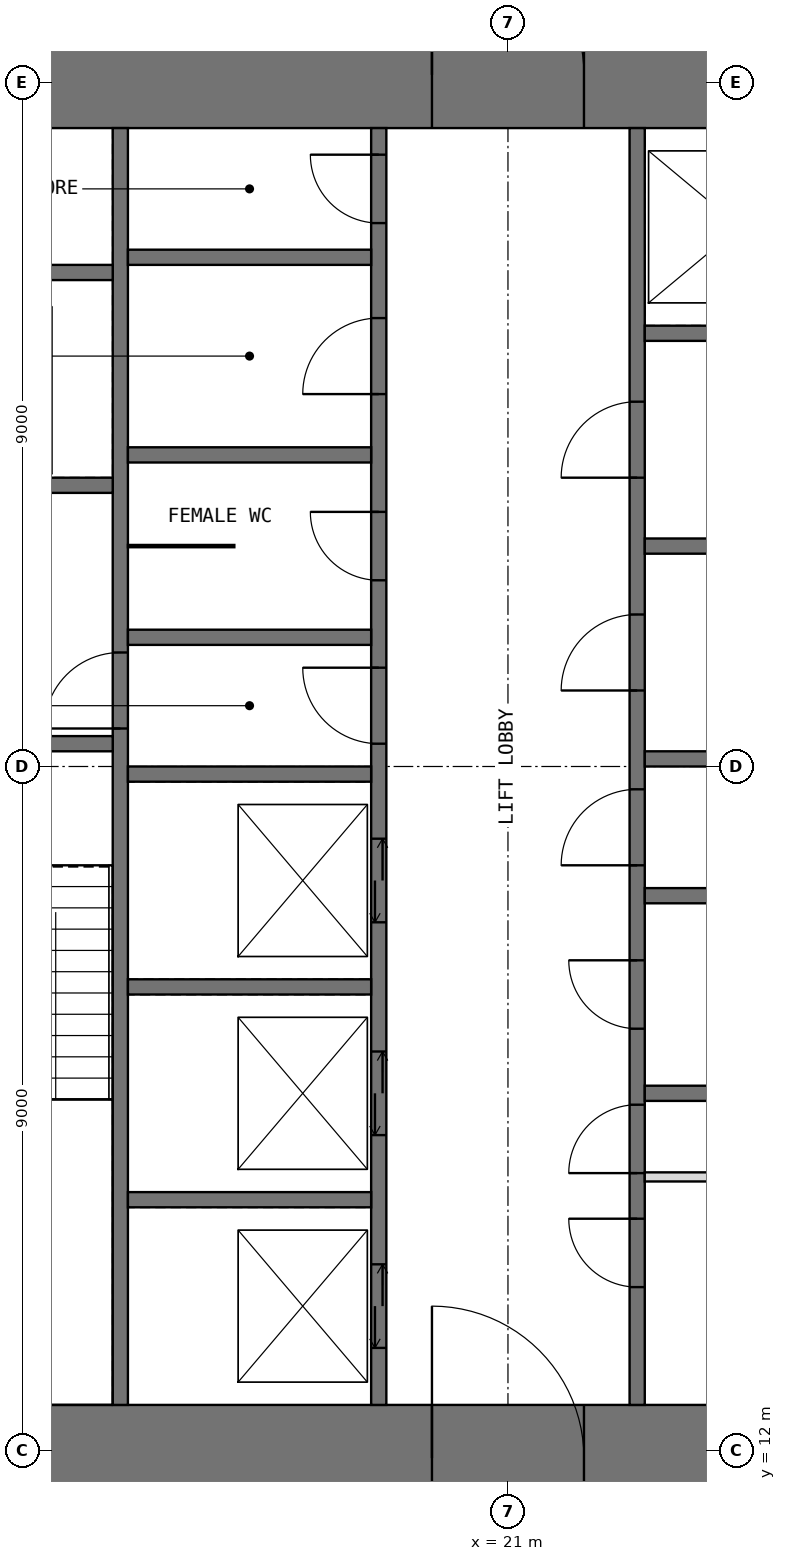
"""IFC4 building model, lengths in metres.
Left out: names, types, materials, properties, quantities, classifications, styles, units other than length and angle.
Written with IfcOpenShell. Run it as: python <this file> out.ifc"""

import sys

from ifc_helpers import new_model, si_unit, direction, frame, frame_2d, origin, place, context, subcontext, project, spatial, rectangle, extrude, element, fill, save


model = new_model("IFC4")
c1 = context("Model", 3, precision=1e-05, world=origin(), true_north=direction((0.0, 1.0)))
c2 = subcontext(c1, "Body", "Model", "MODEL_VIEW")
j1 = project(units=[si_unit("LENGTHUNIT", "METRE"), si_unit("PLANEANGLEUNIT", "RADIAN")], contexts=[c1])
p1 = place(None, origin())
s1 = spatial("IfcSite", under=j1, at=p1, CompositionType="ELEMENT")
p2 = place(p1, origin())
s2 = spatial("IfcBuilding", under=s1, at=p2, CompositionType="ELEMENT")
p3 = place(p2, frame((0.0, 0.0, 218.5)))
s3 = spatial("IfcBuildingStorey", under=s2, at=p3, CompositionType="ELEMENT", Elevation=218.5)
p4 = place(p3, frame((11.2, 11.9, -0.05), z_axis=(0.0, 0.0, 1.0), x_axis=(1.0, 0.0, 0.0)))
e1 = element("IfcWall", 1, at=p4, inside=s3, PredefinedType="SHEAR", context=c2, shape_type="SweptSolid", body=[
    extrude(rectangle(XDim=19.6, YDim=1.4, at=frame_2d((9.8, 0.0))), origin(), (0.0, 0.0, 1.0), 4.0),
])
p5 = place(p4, frame((8.8, 0.0, 0.05)))
e2 = element("IfcOpeningElement", 2, at=p5, cuts=e1, PredefinedType="OPENING", context=c2, shape_type="SweptSolid", body=[
    extrude(rectangle(XDim=2.0, YDim=2.2, at=frame_2d((1.0, 1.1))), frame((0.0, 0.71, 0.0), z_axis=(0.0, -1.0, 0.0), x_axis=(1.0, 0.0, 0.0)), (0.0, 0.0, 1.0), 1.42),
])
p6 = place(p3, frame((11.2, 30.1, -0.05), z_axis=(0.0, 0.0, 1.0), x_axis=(1.0, 0.0, 0.0)))
e3 = element("IfcWall", 3, at=p6, inside=s3, PredefinedType="SHEAR", context=c2, shape_type="SweptSolid", body=[
    extrude(rectangle(XDim=19.6, YDim=1.4, at=frame_2d((9.8, 0.0))), origin(), (0.0, 0.0, 1.0), 4.0),
])
p7 = place(p6, frame((8.8, 0.0, 0.05)))
e4 = element("IfcOpeningElement", 4, at=p7, cuts=e3, PredefinedType="OPENING", context=c2, shape_type="SweptSolid", body=[
    extrude(rectangle(XDim=2.0, YDim=2.2, at=frame_2d((1.0, 1.1))), frame((0.0, 0.71, 0.0), z_axis=(0.0, -1.0, 0.0), x_axis=(1.0, 0.0, 0.0)), (0.0, 0.0, 1.0), 1.42),
])
p8 = place(p3, frame((15.9, 12.6, -0.05), z_axis=(0.0, 0.0, 1.0), x_axis=(0.0, 1.0, 0.0)))
e5 = element("IfcWall", 5, at=p8, inside=s3, PredefinedType="SHEAR", context=c2, shape_type="SweptSolid", body=[
    extrude(rectangle(XDim=16.8, YDim=0.2, at=frame_2d((8.4, 0.0))), origin(), (0.0, 0.0, 1.0), 4.0),
])
p9 = place(p8, frame((8.9, 0.0, 0.05)))
e6 = element("IfcOpeningElement", 6, at=p9, cuts=e5, PredefinedType="OPENING", context=c2, shape_type="SweptSolid", body=[
    extrude(rectangle(XDim=1.0, YDim=2.2, at=frame_2d((0.5, 1.1))), frame((0.0, 0.11, 0.0), z_axis=(0.0, -1.0, 0.0), x_axis=(1.0, 0.0, 0.0)), (0.0, 0.0, 1.0), 0.22),
])
p10 = place(p3, frame((19.3, 12.6, -0.05), z_axis=(0.0, 0.0, 1.0), x_axis=(0.0, 1.0, 0.0)))
e7 = element("IfcWall", 7, at=p10, inside=s3, PredefinedType="SHEAR", context=c2, shape_type="SweptSolid", body=[
    extrude(rectangle(XDim=16.8, YDim=0.2, at=frame_2d((8.4, 0.0))), origin(), (0.0, 0.0, 1.0), 4.0),
])
p11 = place(p10, frame((8.7, 0.0, 0.05)))
e8 = element("IfcOpeningElement", 8, at=p11, cuts=e7, PredefinedType="OPENING", context=c2, shape_type="SweptSolid", body=[
    extrude(rectangle(XDim=1.0, YDim=2.2, at=frame_2d((0.5, 1.1))), frame((0.0, 0.11, 0.0), z_axis=(0.0, -1.0, 0.0), x_axis=(1.0, 0.0, 0.0)), (0.0, 0.0, 1.0), 0.22),
])
p12 = place(p10, frame((10.85, 0.0, 0.05)))
e9 = element("IfcOpeningElement", 9, at=p12, cuts=e7, PredefinedType="OPENING", context=c2, shape_type="SweptSolid", body=[
    extrude(rectangle(XDim=0.9, YDim=2.2, at=frame_2d((0.45, 1.1))), frame((0.0, 0.11, 0.0), z_axis=(0.0, -1.0, 0.0), x_axis=(1.0, 0.0, 0.0)), (0.0, 0.0, 1.0), 0.22),
])
p13 = place(p10, frame((13.3, 0.0, 0.05)))
e10 = element("IfcOpeningElement", 10, at=p13, cuts=e7, PredefinedType="OPENING", context=c2, shape_type="SweptSolid", body=[
    extrude(rectangle(XDim=1.0, YDim=2.2, at=frame_2d((0.5, 1.1))), frame((0.0, 0.11, 0.0), z_axis=(0.0, -1.0, 0.0), x_axis=(1.0, 0.0, 0.0)), (0.0, 0.0, 1.0), 0.22),
])
p14 = place(p10, frame((15.55, 0.0, 0.05)))
e11 = element("IfcOpeningElement", 11, at=p14, cuts=e7, PredefinedType="OPENING", context=c2, shape_type="SweptSolid", body=[
    extrude(rectangle(XDim=0.9, YDim=2.2, at=frame_2d((0.45, 1.1))), frame((0.0, 0.11, 0.0), z_axis=(0.0, -1.0, 0.0), x_axis=(1.0, 0.0, 0.0)), (0.0, 0.0, 1.0), 0.22),
])
p15 = place(p10, frame((0.75, 0.0, 0.05)))
e12 = element("IfcOpeningElement", 12, at=p15, cuts=e7, PredefinedType="OPENING", context=c2, shape_type="SweptSolid", body=[
    extrude(rectangle(XDim=1.1, YDim=2.2, at=frame_2d((0.55, 1.1))), frame((0.0, 0.11, 0.0), z_axis=(0.0, -1.0, 0.0), x_axis=(1.0, 0.0, 0.0)), (0.0, 0.0, 1.0), 0.22),
])
p16 = place(p10, frame((3.55, 0.0, 0.05)))
e13 = element("IfcOpeningElement", 13, at=p16, cuts=e7, PredefinedType="OPENING", context=c2, shape_type="SweptSolid", body=[
    extrude(rectangle(XDim=1.1, YDim=2.2, at=frame_2d((0.55, 1.1))), frame((0.0, 0.11, 0.0), z_axis=(0.0, -1.0, 0.0), x_axis=(1.0, 0.0, 0.0)), (0.0, 0.0, 1.0), 0.22),
])
p17 = place(p10, frame((6.35, 0.0, 0.05)))
e14 = element("IfcOpeningElement", 14, at=p17, cuts=e7, PredefinedType="OPENING", context=c2, shape_type="SweptSolid", body=[
    extrude(rectangle(XDim=1.1, YDim=2.2, at=frame_2d((0.55, 1.1))), frame((0.0, 0.11, 0.0), z_axis=(0.0, -1.0, 0.0), x_axis=(1.0, 0.0, 0.0)), (0.0, 0.0, 1.0), 0.22),
])
p18 = place(p3, frame((22.7, 12.6, -0.05), z_axis=(0.0, 0.0, 1.0), x_axis=(0.0, 1.0, 0.0)))
e15 = element("IfcWall", 15, at=p18, inside=s3, PredefinedType="SHEAR", context=c2, shape_type="SweptSolid", body=[
    extrude(rectangle(XDim=16.8, YDim=0.2, at=frame_2d((8.4, 0.0))), origin(), (0.0, 0.0, 1.0), 4.0),
])
p19 = place(p18, frame((3.05, 0.0, 0.05)))
e16 = element("IfcOpeningElement", 16, at=p19, cuts=e15, PredefinedType="OPENING", context=c2, shape_type="SweptSolid", body=[
    extrude(rectangle(XDim=0.9, YDim=2.2, at=frame_2d((0.45, 1.1))), frame((0.0, 0.11, 0.0), z_axis=(0.0, -1.0, 0.0), x_axis=(1.0, 0.0, 0.0)), (0.0, 0.0, 1.0), 0.22),
])
p20 = place(p18, frame((7.1, 0.0, 0.05)))
e17 = element("IfcOpeningElement", 17, at=p20, cuts=e15, PredefinedType="OPENING", context=c2, shape_type="SweptSolid", body=[
    extrude(rectangle(XDim=1.0, YDim=2.2, at=frame_2d((0.5, 1.1))), frame((0.0, 0.11, 0.0), z_axis=(0.0, -1.0, 0.0), x_axis=(1.0, 0.0, 0.0)), (0.0, 0.0, 1.0), 0.22),
])
p21 = place(p18, frame((1.55, 0.0, 0.05)))
e18 = element("IfcOpeningElement", 18, at=p21, cuts=e15, PredefinedType="OPENING", context=c2, shape_type="SweptSolid", body=[
    extrude(rectangle(XDim=0.9, YDim=2.2, at=frame_2d((0.45, 1.1))), frame((0.0, 0.11, 0.0), z_axis=(0.0, -1.0, 0.0), x_axis=(1.0, 0.0, 0.0)), (0.0, 0.0, 1.0), 0.22),
])
p22 = place(p18, frame((4.95, 0.0, 0.05)))
e19 = element("IfcOpeningElement", 19, at=p22, cuts=e15, PredefinedType="OPENING", context=c2, shape_type="SweptSolid", body=[
    extrude(rectangle(XDim=0.9, YDim=2.2, at=frame_2d((0.45, 1.1))), frame((0.0, 0.11, 0.0), z_axis=(0.0, -1.0, 0.0), x_axis=(1.0, 0.0, 0.0)), (0.0, 0.0, 1.0), 0.22),
])
p23 = place(p18, frame((9.4, 0.0, 0.05)))
e20 = element("IfcOpeningElement", 20, at=p23, cuts=e15, PredefinedType="OPENING", context=c2, shape_type="SweptSolid", body=[
    extrude(rectangle(XDim=1.0, YDim=2.2, at=frame_2d((0.5, 1.1))), frame((0.0, 0.11, 0.0), z_axis=(0.0, -1.0, 0.0), x_axis=(1.0, 0.0, 0.0)), (0.0, 0.0, 1.0), 0.22),
])
p24 = place(p18, frame((12.2, 0.0, 0.05)))
e21 = element("IfcOpeningElement", 21, at=p24, cuts=e15, PredefinedType="OPENING", context=c2, shape_type="SweptSolid", body=[
    extrude(rectangle(XDim=1.0, YDim=2.2, at=frame_2d((0.5, 1.1))), frame((0.0, 0.11, 0.0), z_axis=(0.0, -1.0, 0.0), x_axis=(1.0, 0.0, 0.0)), (0.0, 0.0, 1.0), 0.22),
])
p25 = place(p3, frame((12.6, 21.3, -0.05), z_axis=(0.0, 0.0, 1.0), x_axis=(1.0, 0.0, 0.0)))
e22 = element("IfcWall", 22, at=p25, inside=s3, PredefinedType="SHEAR", context=c2, shape_type="SweptSolid", body=[
    extrude(rectangle(XDim=3.2, YDim=0.2, at=frame_2d((1.6, 0.0))), origin(), (0.0, 0.0, 1.0), 4.0),
])
p26 = place(p25, frame((1.1, 0.0, 0.05)))
e23 = element("IfcOpeningElement", 23, at=p26, cuts=e22, PredefinedType="OPENING", context=c2, shape_type="SweptSolid", body=[
    extrude(rectangle(XDim=1.0, YDim=2.2, at=frame_2d((0.5, 1.1))), frame((0.0, 0.11, 0.0), z_axis=(0.0, -1.0, 0.0), x_axis=(1.0, 0.0, 0.0)), (0.0, 0.0, 1.0), 0.22),
])
p27 = place(p3, frame((12.6, 24.7, -0.05), z_axis=(0.0, 0.0, 1.0), x_axis=(1.0, 0.0, 0.0)))
e24 = element("IfcWall", 24, at=p27, inside=s3, PredefinedType="SHEAR", context=c2, shape_type="SweptSolid", body=[
    extrude(rectangle(XDim=3.2, YDim=0.2, at=frame_2d((1.6, 0.0))), origin(), (0.0, 0.0, 1.0), 4.0),
])
p28 = place(p27, frame((1.0, 0.0, 0.05)))
e25 = element("IfcOpeningElement", 25, at=p28, cuts=e24, PredefinedType="OPENING", context=c2, shape_type="SweptSolid", body=[
    extrude(rectangle(XDim=1.2, YDim=2.2, at=frame_2d((0.6, 1.1))), frame((0.0, 0.11, 0.0), z_axis=(0.0, -1.0, 0.0), x_axis=(1.0, 0.0, 0.0)), (0.0, 0.0, 1.0), 0.22),
])
for number, where, z_axis, x_axis in (
    (26, (12.6, 27.5, -0.05), (0.0, 0.0, 1.0), (1.0, 0.0, 0.0)),
    (27, (16.0, 15.3, -0.05), (0.0, 0.0, 1.0), (1.0, 0.0, 0.0)),
    (28, (16.0, 18.1, -0.05), (0.0, 0.0, 1.0), (1.0, 0.0, 0.0)),
    (29, (16.0, 20.9, -0.05), (0.0, 0.0, 1.0), (1.0, 0.0, 0.0)),
    (30, (16.0, 22.7, -0.05), (0.0, 0.0, 1.0), (1.0, 0.0, 0.0)),
    (31, (16.0, 25.1, -0.05), (0.0, 0.0, 1.0), (1.0, 0.0, 0.0)),
    (32, (16.0, 27.7, -0.05), (0.0, 0.0, 1.0), (1.0, 0.0, 0.0)),
    (33, (22.8, 16.7, -0.05), (0.0, 0.0, 1.0), (1.0, 0.0, 0.0)),
    (34, (22.8, 19.3, -0.05), (0.0, 0.0, 1.0), (1.0, 0.0, 0.0)),
    (35, (22.8, 21.1, -0.05), (0.0, 0.0, 1.0), (1.0, 0.0, 0.0)),
    (36, (22.8, 23.9, -0.05), (0.0, 0.0, 1.0), (1.0, 0.0, 0.0)),
    (37, (22.8, 26.7, -0.05), (0.0, 0.0, 1.0), (1.0, 0.0, 0.0)),
):
    element("IfcWall", number, at=place(p3, frame(where, z_axis=z_axis, x_axis=x_axis)), inside=s3, PredefinedType="SHEAR", context=c2, shape_type="SweptSolid", body=[
        extrude(rectangle(XDim=3.2, YDim=0.2, at=frame_2d((1.6, 0.0))), origin(), (0.0, 0.0, 1.0), 4.0),
    ])
p29 = place(p3, frame((22.8, 15.6, 0.0), z_axis=(0.0, 0.0, 1.0), x_axis=(1.0, 0.0, 0.0)))
e38 = element("IfcWall", 38, at=p29, inside=s3, PredefinedType="PARTITIONING", context=c2, shape_type="SweptSolid", body=[
    extrude(rectangle(XDim=3.2, YDim=0.12, at=frame_2d((1.6, 0.0))), origin(), (0.0, 0.0, 1.0), 3.75),
])
p30 = place(p3, frame((16.0, 23.9, 0.0), z_axis=(0.0, 0.0, 1.0), x_axis=(1.0, 0.0, 0.0)))
e39 = element("IfcWall", 39, at=p30, inside=s3, PredefinedType="PARTITIONING", context=c2, shape_type="SweptSolid", body=[
    extrude(rectangle(XDim=1.4, YDim=0.03, at=frame_2d((0.7, 0.0))), origin(), (0.0, 0.0, 1.0), 3.75),
])
p31 = place(p5, origin())
e40 = element("IfcDoor", 40, at=p31, inside=s3, OperationType="DOUBLE_DOOR_SINGLE_SWING", PredefinedType="DOOR", context=c2, shape_type="SweptSolid", body=[
    extrude(rectangle(XDim=2.0, YDim=2.2, at=frame_2d((1.0, 1.1))), frame((0.0, 0.025, 0.0), z_axis=(0.0, -1.0, 0.0), x_axis=(1.0, 0.0, 0.0)), (0.0, 0.0, 1.0), 0.05),
])
fill(e2, e40)
p32 = place(p7, origin())
e41 = element("IfcDoor", 41, at=p32, inside=s3, OperationType="DOUBLE_DOOR_SINGLE_SWING", PredefinedType="DOOR", context=c2, shape_type="SweptSolid", body=[
    extrude(rectangle(XDim=2.0, YDim=2.2, at=frame_2d((1.0, 1.1))), frame((0.0, 0.025, 0.0), z_axis=(0.0, -1.0, 0.0), x_axis=(1.0, 0.0, 0.0)), (0.0, 0.0, 1.0), 0.05),
])
fill(e4, e41)
p33 = place(p19, origin())
e42 = element("IfcDoor", 42, at=p33, inside=s3, OperationType="SINGLE_SWING_LEFT", PredefinedType="DOOR", context=c2, shape_type="SweptSolid", body=[
    extrude(rectangle(XDim=0.9, YDim=2.2, at=frame_2d((0.45, 1.1))), frame((0.0, 0.025, 0.0), z_axis=(0.0, -1.0, 0.0), x_axis=(1.0, 0.0, 0.0)), (0.0, 0.0, 1.0), 0.05),
])
fill(e16, e42)
p34 = place(p9, origin())
e43 = element("IfcDoor", 43, at=p34, inside=s3, OperationType="SINGLE_SWING_LEFT", PredefinedType="DOOR", context=c2, shape_type="SweptSolid", body=[
    extrude(rectangle(XDim=1.0, YDim=2.2, at=frame_2d((0.5, 1.1))), frame((0.0, 0.025, 0.0), z_axis=(0.0, -1.0, 0.0), x_axis=(1.0, 0.0, 0.0)), (0.0, 0.0, 1.0), 0.05),
])
fill(e6, e43)
p35 = place(p11, origin())
e44 = element("IfcDoor", 44, at=p35, inside=s3, OperationType="SINGLE_SWING_RIGHT", PredefinedType="DOOR", context=c2, shape_type="SweptSolid", body=[
    extrude(rectangle(XDim=1.0, YDim=2.2, at=frame_2d((0.5, 1.1))), frame((0.0, 0.025, 0.0), z_axis=(0.0, -1.0, 0.0), x_axis=(1.0, 0.0, 0.0)), (0.0, 0.0, 1.0), 0.05),
])
fill(e8, e44)
p36 = place(p20, origin())
e45 = element("IfcDoor", 45, at=p36, inside=s3, OperationType="SINGLE_SWING_LEFT", PredefinedType="DOOR", context=c2, shape_type="SweptSolid", body=[
    extrude(rectangle(XDim=1.0, YDim=2.2, at=frame_2d((0.5, 1.1))), frame((0.0, 0.025, 0.0), z_axis=(0.0, -1.0, 0.0), x_axis=(1.0, 0.0, 0.0)), (0.0, 0.0, 1.0), 0.05),
])
fill(e17, e45)
p37 = place(p12, origin())
e46 = element("IfcDoor", 46, at=p37, inside=s3, OperationType="SINGLE_SWING_RIGHT", PredefinedType="DOOR", context=c2, shape_type="SweptSolid", body=[
    extrude(rectangle(XDim=0.9, YDim=2.2, at=frame_2d((0.45, 1.1))), frame((0.0, 0.025, 0.0), z_axis=(0.0, -1.0, 0.0), x_axis=(1.0, 0.0, 0.0)), (0.0, 0.0, 1.0), 0.05),
])
fill(e9, e46)
p38 = place(p13, origin())
e47 = element("IfcDoor", 47, at=p38, inside=s3, OperationType="SINGLE_SWING_LEFT", PredefinedType="DOOR", context=c2, shape_type="SweptSolid", body=[
    extrude(rectangle(XDim=1.0, YDim=2.2, at=frame_2d((0.5, 1.1))), frame((0.0, 0.025, 0.0), z_axis=(0.0, -1.0, 0.0), x_axis=(1.0, 0.0, 0.0)), (0.0, 0.0, 1.0), 0.05),
])
fill(e10, e47)
p39 = place(p14, origin())
e48 = element("IfcDoor", 48, at=p39, inside=s3, OperationType="SINGLE_SWING_RIGHT", PredefinedType="DOOR", context=c2, shape_type="SweptSolid", body=[
    extrude(rectangle(XDim=0.9, YDim=2.2, at=frame_2d((0.45, 1.1))), frame((0.0, 0.025, 0.0), z_axis=(0.0, -1.0, 0.0), x_axis=(1.0, 0.0, 0.0)), (0.0, 0.0, 1.0), 0.05),
])
fill(e11, e48)
p40 = place(p21, origin())
e49 = element("IfcDoor", 49, at=p40, inside=s3, OperationType="SINGLE_SWING_RIGHT", PredefinedType="DOOR", context=c2, shape_type="SweptSolid", body=[
    extrude(rectangle(XDim=0.9, YDim=2.2, at=frame_2d((0.45, 1.1))), frame((0.0, 0.025, 0.0), z_axis=(0.0, -1.0, 0.0), x_axis=(1.0, 0.0, 0.0)), (0.0, 0.0, 1.0), 0.05),
])
fill(e18, e49)
p41 = place(p22, origin())
e50 = element("IfcDoor", 50, at=p41, inside=s3, OperationType="SINGLE_SWING_RIGHT", PredefinedType="DOOR", context=c2, shape_type="SweptSolid", body=[
    extrude(rectangle(XDim=0.9, YDim=2.2, at=frame_2d((0.45, 1.1))), frame((0.0, 0.025, 0.0), z_axis=(0.0, -1.0, 0.0), x_axis=(1.0, 0.0, 0.0)), (0.0, 0.0, 1.0), 0.05),
])
fill(e19, e50)
p42 = place(p23, origin())
e51 = element("IfcDoor", 51, at=p42, inside=s3, OperationType="SINGLE_SWING_LEFT", PredefinedType="DOOR", context=c2, shape_type="SweptSolid", body=[
    extrude(rectangle(XDim=1.0, YDim=2.2, at=frame_2d((0.5, 1.1))), frame((0.0, 0.025, 0.0), z_axis=(0.0, -1.0, 0.0), x_axis=(1.0, 0.0, 0.0)), (0.0, 0.0, 1.0), 0.05),
])
fill(e20, e51)
p43 = place(p24, origin())
e52 = element("IfcDoor", 52, at=p43, inside=s3, OperationType="SINGLE_SWING_LEFT", PredefinedType="DOOR", context=c2, shape_type="SweptSolid", body=[
    extrude(rectangle(XDim=1.0, YDim=2.2, at=frame_2d((0.5, 1.1))), frame((0.0, 0.025, 0.0), z_axis=(0.0, -1.0, 0.0), x_axis=(1.0, 0.0, 0.0)), (0.0, 0.0, 1.0), 0.05),
])
fill(e21, e52)
p44 = place(p15, origin())
e53 = element("IfcDoor", 53, at=p44, inside=s3, OperationType="DOUBLE_DOOR_SLIDING", PredefinedType="DOOR", context=c2, shape_type="SweptSolid", body=[
    extrude(rectangle(XDim=1.1, YDim=2.2, at=frame_2d((0.55, 1.1))), frame((0.0, 0.025, 0.0), z_axis=(0.0, -1.0, 0.0), x_axis=(1.0, 0.0, 0.0)), (0.0, 0.0, 1.0), 0.05),
])
fill(e12, e53)
p45 = place(p16, origin())
e54 = element("IfcDoor", 54, at=p45, inside=s3, OperationType="DOUBLE_DOOR_SLIDING", PredefinedType="DOOR", context=c2, shape_type="SweptSolid", body=[
    extrude(rectangle(XDim=1.1, YDim=2.2, at=frame_2d((0.55, 1.1))), frame((0.0, 0.025, 0.0), z_axis=(0.0, -1.0, 0.0), x_axis=(1.0, 0.0, 0.0)), (0.0, 0.0, 1.0), 0.05),
])
fill(e13, e54)
p46 = place(p17, origin())
e55 = element("IfcDoor", 55, at=p46, inside=s3, OperationType="DOUBLE_DOOR_SLIDING", PredefinedType="DOOR", context=c2, shape_type="SweptSolid", body=[
    extrude(rectangle(XDim=1.1, YDim=2.2, at=frame_2d((0.55, 1.1))), frame((0.0, 0.025, 0.0), z_axis=(0.0, -1.0, 0.0), x_axis=(1.0, 0.0, 0.0)), (0.0, 0.0, 1.0), 0.05),
])
fill(e14, e55)
save(model, sys.argv[1])
